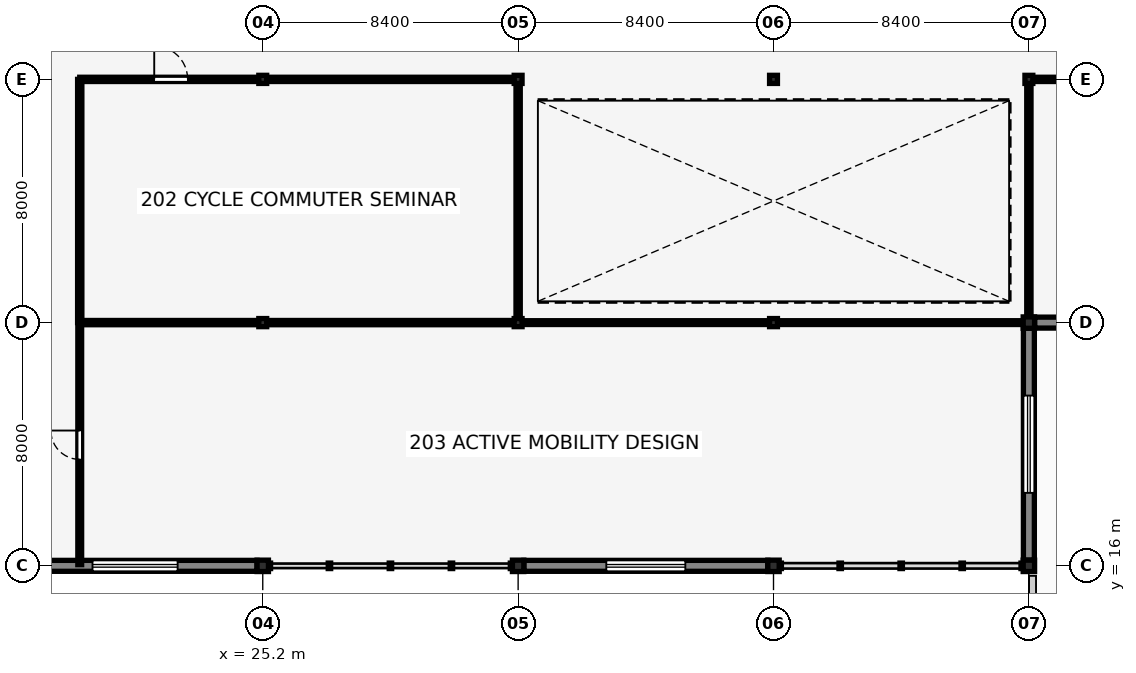
"""IFC4 building model, lengths in metres.
Left out: names, types, materials, properties, quantities, classifications, styles, units other than length and angle.
Written with IfcOpenShell. Run it as: python <this file> out.ifc"""

import sys

from ifc_helpers import new_model, si_unit, direction, frame, frame_2d, origin, origin_2d, place, context, subcontext, project, spatial, rectangle, i_section, extrude, element, fill, save


model = new_model("IFC4")
c1 = context("Model", 3, precision=1e-05, world=origin(), true_north=direction((0.0, 1.0)))
c2 = subcontext(c1, "Body", "Model", "MODEL_VIEW")
j1 = project(units=[si_unit("LENGTHUNIT", "METRE"), si_unit("PLANEANGLEUNIT", "RADIAN")], contexts=[c1])
p1 = place(None, origin())
s1 = spatial("IfcSite", under=j1, at=p1, CompositionType="ELEMENT")
p2 = place(p1, origin())
s2 = spatial("IfcBuilding", under=s1, at=p2, CompositionType="ELEMENT")
p3 = place(p2, frame((0.0, 0.0, 9.52)))
s3 = spatial("IfcBuildingStorey", under=s2, at=p3, CompositionType="ELEMENT", Elevation=9.52)
p4 = place(p3, frame((25.2, 16.0, 0.0), z_axis=(0.0, 0.0, 1.0), x_axis=(1.0, 0.0, 0.0)))
e1 = element("IfcColumn", 1, at=p4, inside=s3, PredefinedType="COLUMN", context=c2, shape_type="SweptSolid", body=[
    extrude(i_section(OverallWidth=0.375, OverallDepth=0.375, WebThickness=0.017, FlangeThickness=0.027, FilletRadius=0.015, at=origin_2d()), origin(), (0.0, 0.0, 1.0), 3.57),
])
for number, where, z_axis, x_axis in (
    (2, (25.2, 24.0, 0.0), (0.0, 0.0, 1.0), (1.0, 0.0, 0.0)),
    (3, (25.2, 32.0, 0.0), (0.0, 0.0, 1.0), (1.0, 0.0, 0.0)),
):
    element("IfcColumn", number, at=place(p3, frame(where, z_axis=z_axis, x_axis=x_axis)), inside=s3, PredefinedType="COLUMN", context=c2, shape_type="SweptSolid", body=[
        extrude(i_section(OverallWidth=0.259, OverallDepth=0.267, WebThickness=0.013, FlangeThickness=0.021, FilletRadius=0.013, at=origin_2d()), origin(), (0.0, 0.0, 1.0), 3.57),
    ])
p5 = place(p3, frame((33.6, 16.0, 0.0), z_axis=(0.0, 0.0, 1.0), x_axis=(1.0, 0.0, 0.0)))
e4 = element("IfcColumn", 4, at=p5, inside=s3, PredefinedType="COLUMN", context=c2, shape_type="SweptSolid", body=[
    extrude(i_section(OverallWidth=0.375, OverallDepth=0.375, WebThickness=0.017, FlangeThickness=0.027, FilletRadius=0.015, at=origin_2d()), origin(), (0.0, 0.0, 1.0), 3.57),
])
for number, where, z_axis, x_axis in (
    (5, (33.6, 24.0, 0.0), (0.0, 0.0, 1.0), (1.0, 0.0, 0.0)),
    (6, (33.6, 32.0, 0.0), (0.0, 0.0, 1.0), (1.0, 0.0, 0.0)),
):
    element("IfcColumn", number, at=place(p3, frame(where, z_axis=z_axis, x_axis=x_axis)), inside=s3, PredefinedType="COLUMN", context=c2, shape_type="SweptSolid", body=[
        extrude(i_section(OverallWidth=0.259, OverallDepth=0.267, WebThickness=0.013, FlangeThickness=0.021, FilletRadius=0.013, at=origin_2d()), origin(), (0.0, 0.0, 1.0), 3.57),
    ])
p6 = place(p3, frame((42.0, 16.0, 0.0), z_axis=(0.0, 0.0, 1.0), x_axis=(1.0, 0.0, 0.0)))
e7 = element("IfcColumn", 7, at=p6, inside=s3, PredefinedType="COLUMN", context=c2, shape_type="SweptSolid", body=[
    extrude(i_section(OverallWidth=0.375, OverallDepth=0.375, WebThickness=0.017, FlangeThickness=0.027, FilletRadius=0.015, at=origin_2d()), origin(), (0.0, 0.0, 1.0), 3.57),
])
for number, where, z_axis, x_axis in (
    (8, (42.0, 24.0, 0.0), (0.0, 0.0, 1.0), (1.0, 0.0, 0.0)),
    (9, (42.0, 32.0, 0.0), (0.0, 0.0, 1.0), (1.0, 0.0, 0.0)),
):
    element("IfcColumn", number, at=place(p3, frame(where, z_axis=z_axis, x_axis=x_axis)), inside=s3, PredefinedType="COLUMN", context=c2, shape_type="SweptSolid", body=[
        extrude(i_section(OverallWidth=0.259, OverallDepth=0.267, WebThickness=0.013, FlangeThickness=0.021, FilletRadius=0.013, at=origin_2d()), origin(), (0.0, 0.0, 1.0), 3.57),
    ])
for number, where, z_axis, x_axis in (
    (10, (50.4, 16.0, 0.0), (0.0, 0.0, 1.0), (1.0, 0.0, 0.0)),
    (11, (50.4, 24.0, 0.0), (0.0, 0.0, 1.0), (1.0, 0.0, 0.0)),
):
    element("IfcColumn", number, at=place(p3, frame(where, z_axis=z_axis, x_axis=x_axis)), inside=s3, PredefinedType="COLUMN", context=c2, shape_type="SweptSolid", body=[
        extrude(i_section(OverallWidth=0.375, OverallDepth=0.375, WebThickness=0.017, FlangeThickness=0.027, FilletRadius=0.015, at=origin_2d()), origin(), (0.0, 0.0, 1.0), 3.57),
    ])
p7 = place(p3, frame((50.4, 32.0, 0.0), z_axis=(0.0, 0.0, 1.0), x_axis=(1.0, 0.0, 0.0)))
e12 = element("IfcColumn", 12, at=p7, inside=s3, PredefinedType="COLUMN", context=c2, shape_type="SweptSolid", body=[
    extrude(i_section(OverallWidth=0.259, OverallDepth=0.267, WebThickness=0.013, FlangeThickness=0.021, FilletRadius=0.013, at=origin_2d()), origin(), (0.0, 0.0, 1.0), 6.275),
])
p8 = place(p3, frame((50.587, 24.0, 0.0), z_axis=(0.0, 0.0, 1.0), x_axis=(1.0, 0.0, 0.0)))
e13 = element("IfcWall", 13, at=p8, inside=s3, PredefinedType="SOLIDWALL", context=c2, shape_type="SweptSolid", body=[
    extrude(rectangle(XDim=8.025, YDim=0.36, at=frame_2d((4.013, 0.0))), origin(), (0.0, 0.0, 1.0), 3.27),
])
p9 = place(p8, frame((2.213, 0.0, 0.9), z_axis=(0.0, 0.0, 1.0), x_axis=(1.0, 0.0, 0.0)))
e14 = element("IfcOpeningElement", 14, at=p9, cuts=e13, PredefinedType="OPENING", context=c2, shape_type="SweptSolid", body=[
    extrude(rectangle(XDim=3.6, YDim=1.8, at=frame_2d((1.8, 0.9))), frame((0.0, 0.19, 0.0), z_axis=(0.0, -1.0, 0.0), x_axis=(1.0, 0.0, 0.0)), (0.0, 0.0, 1.0), 0.38),
])
p10 = place(p3, frame((50.4, 16.187, 0.0), z_axis=(0.0, 0.0, 1.0), x_axis=(0.0, 1.0, 0.0)))
e15 = element("IfcWall", 15, at=p10, inside=s3, PredefinedType="SOLIDWALL", context=c2, shape_type="SweptSolid", body=[
    extrude(rectangle(XDim=7.625, YDim=0.36, at=frame_2d((3.813, 0.0))), origin(), (0.0, 0.0, 1.0), 3.57),
])
p11 = place(p10, frame((2.213, 0.0, 0.9), z_axis=(0.0, 0.0, 1.0), x_axis=(1.0, 0.0, 0.0)))
e16 = element("IfcOpeningElement", 16, at=p11, cuts=e15, PredefinedType="OPENING", context=c2, shape_type="SweptSolid", body=[
    extrude(rectangle(XDim=3.2, YDim=1.65, at=frame_2d((1.6, 0.825))), frame((0.0, 0.19, 0.0), z_axis=(0.0, -1.0, 0.0), x_axis=(1.0, 0.0, 0.0)), (0.0, 0.0, 1.0), 0.38),
])
p12 = place(p3, frame((16.987, 16.0, 0.0), z_axis=(0.0, 0.0, 1.0), x_axis=(1.0, 0.0, 0.0)))
e17 = element("IfcWall", 17, at=p12, inside=s3, PredefinedType="SOLIDWALL", context=c2, shape_type="SweptSolid", body=[
    extrude(rectangle(XDim=8.025, YDim=0.36, at=frame_2d((4.013, 0.0))), origin(), (0.0, 0.0, 1.0), 3.27),
])
p13 = place(p12, frame((2.613, 0.0, 0.9), z_axis=(0.0, 0.0, 1.0), x_axis=(1.0, 0.0, 0.0)))
e18 = element("IfcOpeningElement", 18, at=p13, cuts=e17, PredefinedType="OPENING", context=c2, shape_type="SweptSolid", body=[
    extrude(rectangle(XDim=2.8, YDim=1.6, at=frame_2d((1.4, 0.8))), frame((0.0, 0.19, 0.0), z_axis=(0.0, -1.0, 0.0), x_axis=(1.0, 0.0, 0.0)), (0.0, 0.0, 1.0), 0.38),
])
p14 = place(p3, frame((33.787, 16.0, 0.0), z_axis=(0.0, 0.0, 1.0), x_axis=(1.0, 0.0, 0.0)))
e19 = element("IfcWall", 19, at=p14, inside=s3, PredefinedType="SOLIDWALL", context=c2, shape_type="SweptSolid", body=[
    extrude(rectangle(XDim=8.025, YDim=0.36, at=frame_2d((4.013, 0.0))), origin(), (0.0, 0.0, 1.0), 3.27),
])
p15 = place(p14, frame((2.713, 0.0, 0.9), z_axis=(0.0, 0.0, 1.0), x_axis=(1.0, 0.0, 0.0)))
e20 = element("IfcOpeningElement", 20, at=p15, cuts=e19, PredefinedType="OPENING", context=c2, shape_type="SweptSolid", body=[
    extrude(rectangle(XDim=2.6, YDim=1.8, at=frame_2d((1.3, 0.9))), frame((0.0, 0.19, 0.0), z_axis=(0.0, -1.0, 0.0), x_axis=(1.0, 0.0, 0.0)), (0.0, 0.0, 1.0), 0.38),
])
p16 = place(p3, frame((50.52, 8.12, 0.0), z_axis=(0.0, 0.0, 1.0), x_axis=(0.0, 1.0, 0.0)))
e21 = element("IfcWall", 21, at=p16, inside=s3, PredefinedType="PARAPET", context=c2, shape_type="SweptSolid", body=[
    extrude(rectangle(XDim=7.552, YDim=0.23, at=frame_2d((3.776, 0.0))), origin(), (0.0, 0.0, 1.0), 1.05),
])
p17 = place(p3, frame((50.519, 32.0, 0.0), z_axis=(0.0, 0.0, 1.0), x_axis=(1.0, 0.0, 0.0)))
e22 = element("IfcWall", 22, at=p17, inside=s3, PredefinedType="PARTITIONING", context=c2, shape_type="SweptSolid", body=[
    extrude(rectangle(XDim=8.161, YDim=0.14, at=frame_2d((4.081, 0.0))), origin(), (0.0, 0.0, 1.0), 3.037),
])
p18 = place(p17, frame((4.681, 0.0, 0.0), z_axis=(0.0, 0.0, 1.0), x_axis=(-1.0, 0.0, 0.0)))
e23 = element("IfcOpeningElement", 23, at=p18, cuts=e22, PredefinedType="OPENING", context=c2, shape_type="SweptSolid", body=[
    extrude(rectangle(XDim=1.1, YDim=2.2, at=frame_2d((0.55, 1.1))), frame((0.0, 0.08, 0.0), z_axis=(0.0, -1.0, 0.0), x_axis=(1.0, 0.0, 0.0)), (0.0, 0.0, 1.0), 0.16),
])
p19 = place(p3, frame((19.18, 32.0, 0.0), z_axis=(0.0, 0.0, 1.0), x_axis=(1.0, 0.0, 0.0)))
e24 = element("IfcWall", 24, at=p19, inside=s3, PredefinedType="PARTITIONING", context=c2, shape_type="SweptSolid", body=[
    extrude(rectangle(XDim=5.901, YDim=0.14, at=frame_2d((2.95, 0.0))), origin(), (0.0, 0.0, 1.0), 3.27),
])
p20 = place(p19, frame((2.45, 0.0, 0.0), z_axis=(0.0, 0.0, 1.0), x_axis=(1.0, 0.0, 0.0)))
e25 = element("IfcOpeningElement", 25, at=p20, cuts=e24, PredefinedType="OPENING", context=c2, shape_type="SweptSolid", body=[
    extrude(rectangle(XDim=1.1, YDim=2.2, at=frame_2d((0.55, 1.1))), frame((0.0, 0.08, 0.0), z_axis=(0.0, -1.0, 0.0), x_axis=(1.0, 0.0, 0.0)), (0.0, 0.0, 1.0), 0.16),
])
p21 = place(p3, frame((19.18, 16.04, 0.0), z_axis=(0.0, 0.0, 1.0), x_axis=(0.0, 1.0, 0.0)))
e26 = element("IfcWall", 26, at=p21, inside=s3, PredefinedType="PARTITIONING", context=c2, shape_type="SweptSolid", body=[
    extrude(rectangle(XDim=7.96, YDim=0.125, at=frame_2d((3.98, 0.0))), origin(), (0.0, 0.0, 1.0), 3.219),
])
p22 = place(p21, frame((3.46, 0.0, 0.0), z_axis=(0.0, 0.0, 1.0), x_axis=(1.0, 0.0, 0.0)))
e27 = element("IfcOpeningElement", 27, at=p22, cuts=e26, PredefinedType="OPENING", context=c2, shape_type="SweptSolid", body=[
    extrude(rectangle(XDim=0.95, YDim=2.15, at=frame_2d((0.475, 1.075))), frame((0.0, 0.073, 0.0), z_axis=(0.0, -1.0, 0.0), x_axis=(1.0, 0.0, 0.0)), (0.0, 0.0, 1.0), 0.145),
])
p23 = place(p3, frame((50.4, 24.177, 0.0), z_axis=(0.0, 0.0, 1.0), x_axis=(0.0, 1.0, 0.0)))
e28 = element("IfcWall", 28, at=p23, inside=s3, PredefinedType="PARTITIONING", context=c2, shape_type="SweptSolid", body=[
    extrude(rectangle(XDim=7.699, YDim=0.14, at=frame_2d((3.85, 0.0))), origin(), (0.0, 0.0, 1.0), 3.27),
])
p24 = place(p3, frame((25.319, 32.0, 0.0), z_axis=(0.0, 0.0, 1.0), x_axis=(1.0, 0.0, 0.0)))
e29 = element("IfcWall", 29, at=p24, inside=s3, PredefinedType="PARTITIONING", context=c2, shape_type="SweptSolid", body=[
    extrude(rectangle(XDim=8.161, YDim=0.14, at=frame_2d((4.081, 0.0))), origin(), (0.0, 0.0, 1.0), 3.27),
])
p25 = place(p3, frame((19.18, 24.0, 0.0), z_axis=(0.0, 0.0, 1.0), x_axis=(1.0, 0.0, 0.0)))
e30 = element("IfcWall", 30, at=p25, inside=s3, PredefinedType="PARTITIONING", context=c2, shape_type="SweptSolid", body=[
    extrude(rectangle(XDim=5.901, YDim=0.14, at=frame_2d((2.95, 0.0))), origin(), (0.0, 0.0, 1.0), 3.037),
])
p26 = place(p3, frame((25.319, 24.0, 0.0), z_axis=(0.0, 0.0, 1.0), x_axis=(1.0, 0.0, 0.0)))
e31 = element("IfcWall", 31, at=p26, inside=s3, PredefinedType="PARTITIONING", context=c2, shape_type="SweptSolid", body=[
    extrude(rectangle(XDim=8.161, YDim=0.14, at=frame_2d((4.081, 0.0))), origin(), (0.0, 0.0, 1.0), 3.037),
])
p27 = place(p3, frame((19.18, 24.0, 0.0), z_axis=(0.0, 0.0, 1.0), x_axis=(0.0, 1.0, 0.0)))
e32 = element("IfcWall", 32, at=p27, inside=s3, PredefinedType="PARTITIONING", context=c2, shape_type="SweptSolid", body=[
    extrude(rectangle(XDim=8.0, YDim=0.14, at=frame_2d((4.0, 0.0))), origin(), (0.0, 0.0, 1.0), 3.219),
])
p28 = place(p3, frame((33.6, 24.123, 0.0), z_axis=(0.0, 0.0, 1.0), x_axis=(0.0, 1.0, 0.0)))
e33 = element("IfcWall", 33, at=p28, inside=s3, PredefinedType="PARTITIONING", context=c2, shape_type="SweptSolid", body=[
    extrude(rectangle(XDim=7.753, YDim=0.14, at=frame_2d((3.877, 0.0))), origin(), (0.0, 0.0, 1.0), 3.107),
])
p29 = place(p3, frame((33.719, 24.0, 0.0), z_axis=(0.0, 0.0, 1.0), x_axis=(1.0, 0.0, 0.0)))
e34 = element("IfcWall", 34, at=p29, inside=s3, PredefinedType="PARTITIONING", context=c2, shape_type="SweptSolid", body=[
    extrude(rectangle(XDim=8.161, YDim=0.125, at=frame_2d((4.081, 0.0))), origin(), (0.0, 0.0, 1.0), 3.037),
])
p30 = place(p3, frame((42.119, 24.0, 0.0), z_axis=(0.0, 0.0, 1.0), x_axis=(1.0, 0.0, 0.0)))
e35 = element("IfcWall", 35, at=p30, inside=s3, PredefinedType="PARTITIONING", context=c2, shape_type="SweptSolid", body=[
    extrude(rectangle(XDim=8.103, YDim=0.125, at=frame_2d((4.052, 0.0))), origin(), (0.0, 0.0, 1.0), 3.57),
])
p31 = place(p11, origin())
e36 = element("IfcWindow", 36, at=p31, inside=s3, PartitioningType="TRIPLE_PANEL_VERTICAL", PredefinedType="WINDOW", context=c2, shape_type="SweptSolid", body=[
    extrude(rectangle(XDim=3.2, YDim=1.65, at=frame_2d((1.6, 0.825))), frame((0.0, 0.03, 0.0), z_axis=(0.0, -1.0, 0.0), x_axis=(1.0, 0.0, 0.0)), (0.0, 0.0, 1.0), 0.06),
])
fill(e16, e36)
p32 = place(p13, origin())
e37 = element("IfcWindow", 37, at=p32, inside=s3, PartitioningType="DOUBLE_PANEL_VERTICAL", PredefinedType="WINDOW", context=c2, shape_type="SweptSolid", body=[
    extrude(rectangle(XDim=2.8, YDim=1.6, at=frame_2d((1.4, 0.8))), frame((0.0, 0.03, 0.0), z_axis=(0.0, -1.0, 0.0), x_axis=(1.0, 0.0, 0.0)), (0.0, 0.0, 1.0), 0.06),
])
fill(e18, e37)
p33 = place(p15, origin())
e38 = element("IfcWindow", 38, at=p33, inside=s3, PartitioningType="DOUBLE_PANEL_VERTICAL", PredefinedType="WINDOW", context=c2, shape_type="SweptSolid", body=[
    extrude(rectangle(XDim=2.6, YDim=1.8, at=frame_2d((1.3, 0.9))), frame((0.0, 0.03, 0.0), z_axis=(0.0, -1.0, 0.0), x_axis=(1.0, 0.0, 0.0)), (0.0, 0.0, 1.0), 0.06),
])
fill(e20, e38)
p34 = place(p20, origin())
e39 = element("IfcDoor", 39, at=p34, inside=s3, OperationType="SINGLE_SWING_LEFT", PredefinedType="DOOR", context=c2, shape_type="SweptSolid", body=[
    extrude(rectangle(XDim=1.1, YDim=2.2, at=frame_2d((0.55, 1.1))), frame((0.0, 0.025, 0.0), z_axis=(0.0, -1.0, 0.0), x_axis=(1.0, 0.0, 0.0)), (0.0, 0.0, 1.0), 0.05),
])
fill(e25, e39)
p35 = place(p22, origin())
e40 = element("IfcDoor", 40, at=p35, inside=s3, OperationType="SINGLE_SWING_RIGHT", PredefinedType="DOOR", context=c2, shape_type="SweptSolid", body=[
    extrude(rectangle(XDim=0.95, YDim=2.15, at=frame_2d((0.475, 1.075))), frame((0.0, 0.025, 0.0), z_axis=(0.0, -1.0, 0.0), x_axis=(1.0, 0.0, 0.0)), (0.0, 0.0, 1.0), 0.05),
])
fill(e27, e40)
save(model, sys.argv[1])
